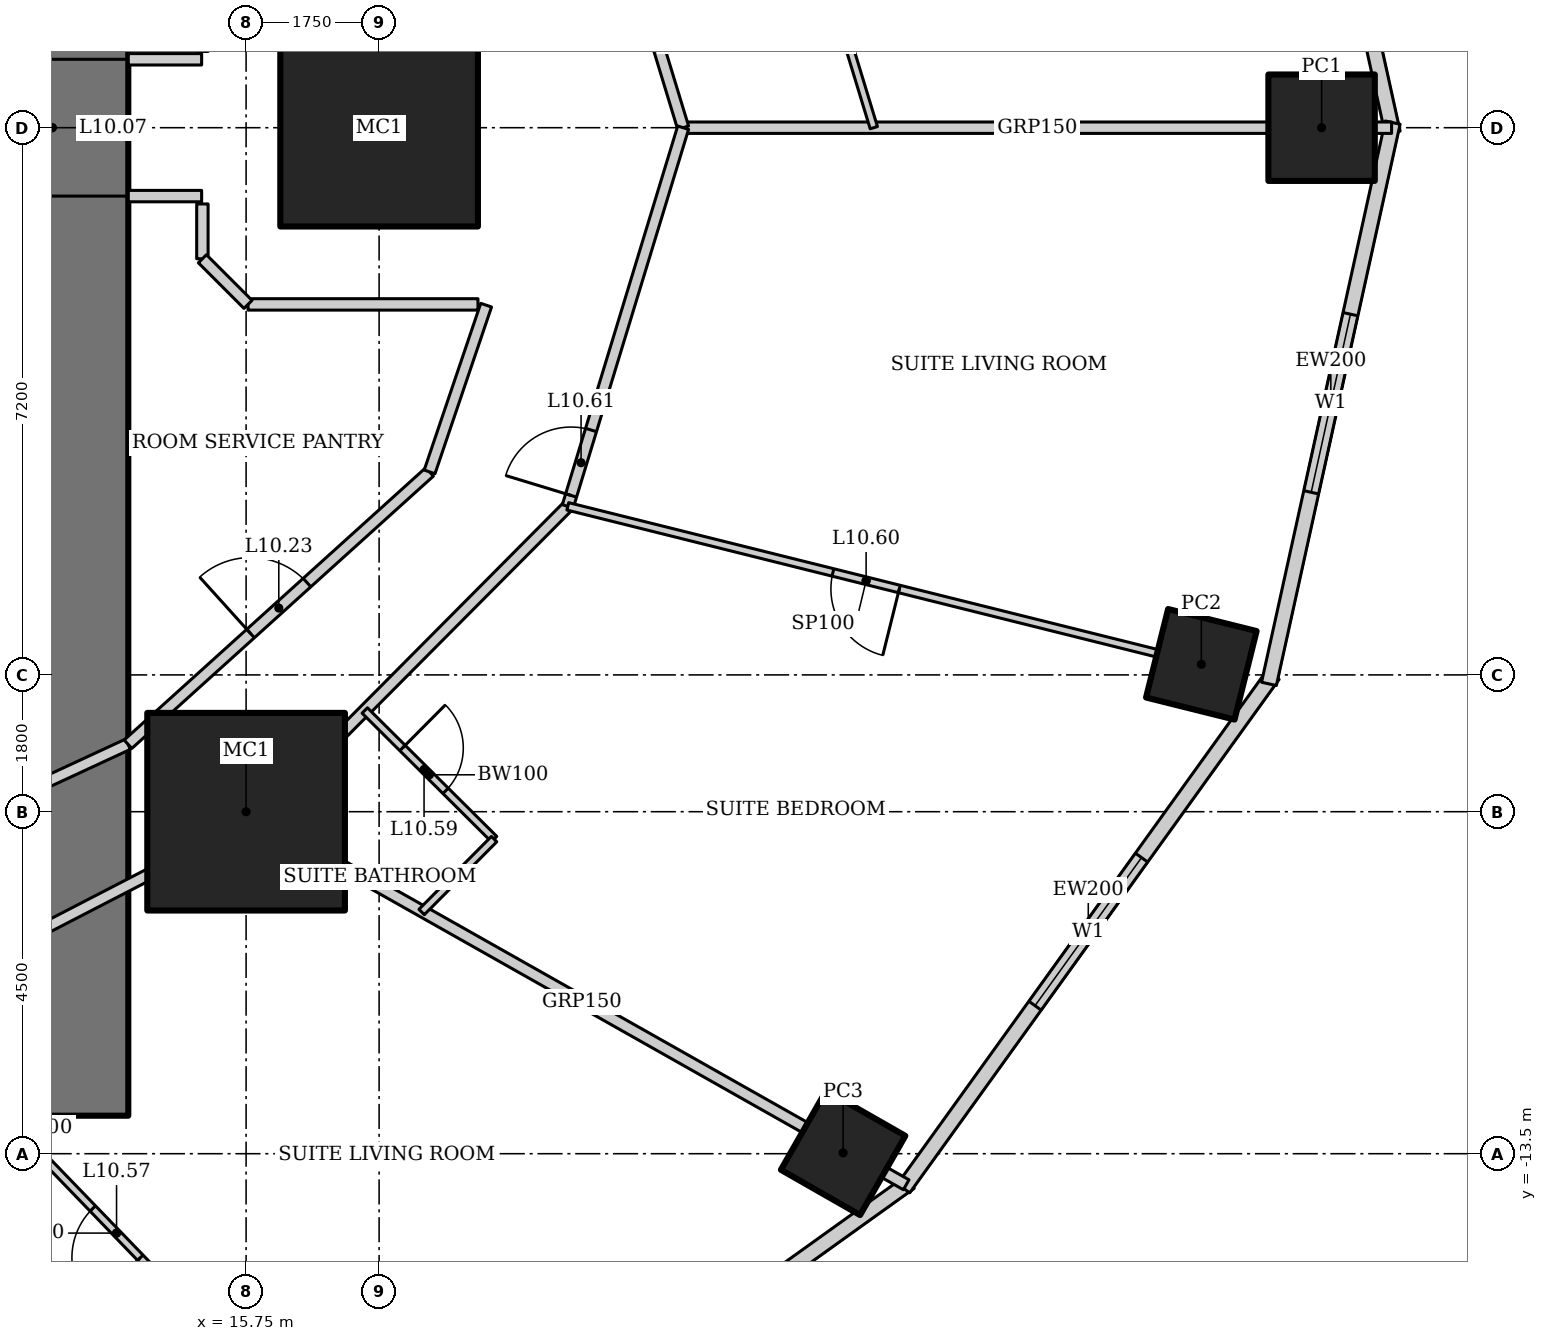
"""IFC4 building model, lengths in metres.
Left out: names, types, materials, properties, quantities, classifications, styles, units other than length and angle.
Written with IfcOpenShell. Run it as: python <this file> out.ifc"""

import sys

from ifc_helpers import new_model, si_unit, direction, frame, frame_2d, origin, origin_2d, place, context, subcontext, project, spatial, rectangle, hollow_rectangle, extrude, element, fill, save


model = new_model("IFC4")
c1 = context("Model", 3, precision=1e-05, world=origin(), true_north=direction((0.0, 1.0)))
c2 = subcontext(c1, "Body", "Model", "MODEL_VIEW")
j1 = project(units=[si_unit("LENGTHUNIT", "METRE"), si_unit("PLANEANGLEUNIT", "RADIAN")], contexts=[c1])
p1 = place(None, origin())
s1 = spatial("IfcSite", under=j1, at=p1, CompositionType="ELEMENT")
p2 = place(p1, origin())
s2 = spatial("IfcBuilding", under=s1, at=p2, CompositionType="ELEMENT")
p3 = place(p2, frame((0.0, 0.0, 51.4)))
s3 = spatial("IfcBuildingStorey", under=s2, at=p3, CompositionType="ELEMENT", Elevation=51.4)
for number, where, z_axis, x_axis in (
    (1, (17.5, 0.0, 0.0), (0.0, 0.0, 1.0), (1.0, 0.0, 0.0)),
    (2, (15.75, -9.0, 0.0), (0.0, 0.0, 1.0), (1.0, 0.0, 0.0)),
):
    element("IfcColumn", number, at=place(p3, frame(where, z_axis=z_axis, x_axis=x_axis)), inside=s3, PredefinedType="COLUMN", context=c2, shape_type="SweptSolid", body=[
        extrude(hollow_rectangle(XDim=2.6, YDim=2.6, WallThickness=0.13, at=origin_2d()), origin(), (0.0, 0.0, 1.0), 3.6),
    ])
p4 = place(p3, frame((29.9, 0.0, 0.0), z_axis=(0.0, 0.0, 1.0), x_axis=(1.0, 0.0, 0.0)))
e3 = element("IfcColumn", 3, at=p4, inside=s3, PredefinedType="COLUMN", context=c2, shape_type="SweptSolid", body=[
    extrude(hollow_rectangle(XDim=1.4, YDim=1.4, WallThickness=0.1, at=origin_2d()), origin(), (0.0, 0.0, 1.0), 3.6),
])
p5 = place(p3, frame((23.605, -13.489, 0.0), z_axis=(0.0, 0.0, 1.0), x_axis=(0.496139221777, 0.86824298017, 0.0)))
e4 = element("IfcColumn", 4, at=p5, inside=s3, PredefinedType="COLUMN", context=c2, shape_type="SweptSolid", body=[
    extrude(hollow_rectangle(XDim=1.2, YDim=1.2, WallThickness=0.12, at=origin_2d()), origin(), (0.0, 0.0, 1.0), 3.6),
])
p6 = place(p3, frame((28.318, -7.06, 0.0), z_axis=(0.0, 0.0, 1.0), x_axis=(0.2419218956, 0.970295726276, 0.0)))
e5 = element("IfcColumn", 5, at=p6, inside=s3, PredefinedType="COLUMN", context=c2, shape_type="SweptSolid", body=[
    extrude(hollow_rectangle(XDim=1.2, YDim=1.2, WallThickness=0.1, at=origin_2d()), origin(), (0.0, 0.0, 1.0), 3.6),
])
p7 = place(p3, frame((13.2, -13.0, 0.0), z_axis=(0.0, 0.0, 1.0), x_axis=(0.0, 1.0, 0.0)))
e6 = element("IfcWall", 6, at=p7, inside=s3, PredefinedType="SHEAR", context=c2, shape_type="SweptSolid", body=[
    extrude(rectangle(XDim=26.0, YDim=2.0, at=frame_2d((13.0, 0.0))), origin(), (0.0, 0.0, 1.0), 3.6),
])
p8 = place(p7, frame((12.1, 0.0, 0.0)))
e7 = element("IfcOpeningElement", 7, at=p8, cuts=e6, PredefinedType="OPENING", context=c2, shape_type="SweptSolid", body=[
    extrude(rectangle(XDim=1.8, YDim=2.1, at=frame_2d((0.9, 1.05))), frame((0.0, 1.01, 0.0), z_axis=(0.0, -1.0, 0.0), x_axis=(1.0, 0.0, 0.0)), (0.0, 0.0, 1.0), 2.02),
])
p9 = place(p3, frame((30.835, -0.067, 0.0), z_axis=(0.0, 0.0, 1.0), x_axis=(-0.215238065514, 0.976561608478, 0.0)))
e8 = element("IfcWall", 8, at=p9, inside=s3, PredefinedType="SOLIDWALL", context=c2, shape_type="SweptSolid", body=[
    extrude(rectangle(XDim=7.562, YDim=0.2, at=frame_2d((3.781, 0.0))), origin(), (0.0, 0.0, 1.0), 3.45),
])
p10 = place(p9, frame((2.581, 0.0, 0.5)))
e9 = element("IfcOpeningElement", 9, at=p10, cuts=e8, PredefinedType="OPENING", context=c2, shape_type="SweptSolid", body=[
    extrude(rectangle(XDim=2.4, YDim=2.2, at=frame_2d((1.2, 1.1))), frame((0.0, 0.11, 0.0), z_axis=(0.0, -1.0, 0.0), x_axis=(1.0, 0.0, 0.0)), (0.0, 0.0, 1.0), 0.22),
])
p11 = place(p3, frame((17.929, -18.572, 0.0), z_axis=(0.0, 0.0, 1.0), x_axis=(0.812791321576, 0.582554948112, 0.0)))
e10 = element("IfcWall", 10, at=p11, inside=s3, PredefinedType="SOLIDWALL", context=c2, shape_type="SweptSolid", body=[
    extrude(rectangle(XDim=8.063, YDim=0.2, at=frame_2d((4.032, 0.0))), origin(), (0.0, 0.0, 1.0), 3.45),
])
p12 = place(p11, frame((2.832, 0.0, 0.5)))
e11 = element("IfcOpeningElement", 11, at=p12, cuts=e10, PredefinedType="OPENING", context=c2, shape_type="SweptSolid", body=[
    extrude(rectangle(XDim=2.4, YDim=2.2, at=frame_2d((1.2, 1.1))), frame((0.0, 0.11, 0.0), z_axis=(0.0, -1.0, 0.0), x_axis=(1.0, 0.0, 0.0)), (0.0, 0.0, 1.0), 0.22),
])
p13 = place(p3, frame((24.4, -13.957, 0.0), z_axis=(0.0, 0.0, 1.0), x_axis=(0.583937613703, 0.811798536155, 0.0)))
e12 = element("IfcWall", 12, at=p13, inside=s3, PredefinedType="SOLIDWALL", context=c2, shape_type="SweptSolid", body=[
    extrude(rectangle(XDim=8.323, YDim=0.2, at=frame_2d((4.162, 0.0))), origin(), (0.0, 0.0, 1.0), 3.45),
])
p14 = place(p13, frame((2.961, 0.0, 0.5)))
e13 = element("IfcOpeningElement", 13, at=p14, cuts=e12, PredefinedType="OPENING", context=c2, shape_type="SweptSolid", body=[
    extrude(rectangle(XDim=2.4, YDim=2.2, at=frame_2d((1.2, 1.1))), frame((0.0, 0.11, 0.0), z_axis=(0.0, -1.0, 0.0), x_axis=(1.0, 0.0, 0.0)), (0.0, 0.0, 1.0), 0.22),
])
p15 = place(p3, frame((29.208, -7.318, 0.0), z_axis=(0.0, 0.0, 1.0), x_axis=(0.215238065514, 0.976561608478, 0.0)))
e14 = element("IfcWall", 14, at=p15, inside=s3, PredefinedType="SOLIDWALL", context=c2, shape_type="SweptSolid", body=[
    extrude(rectangle(XDim=7.562, YDim=0.2, at=frame_2d((3.781, 0.0))), origin(), (0.0, 0.0, 1.0), 3.45),
])
p16 = place(p15, frame((2.581, 0.0, 0.5)))
e15 = element("IfcOpeningElement", 15, at=p16, cuts=e14, PredefinedType="OPENING", context=c2, shape_type="SweptSolid", body=[
    extrude(rectangle(XDim=2.4, YDim=2.2, at=frame_2d((1.2, 1.1))), frame((0.0, 0.11, 0.0), z_axis=(0.0, -1.0, 0.0), x_axis=(1.0, 0.0, 0.0)), (0.0, 0.0, 1.0), 0.22),
])
p17 = place(p3, frame((30.821, 0.0, 0.0), z_axis=(0.0, 0.0, 1.0), x_axis=(-1.0, 0.0, 0.0)))
e16 = element("IfcWall", 16, at=p17, inside=s3, PredefinedType="PARTITIONING", context=c2, shape_type="SweptSolid", body=[
    extrude(rectangle(XDim=9.321, YDim=0.15, at=frame_2d((4.66, 0.0))), origin(), (0.0, 0.0, 1.0), 2.528),
])
p18 = place(p3, frame((24.435, -13.909, 0.0), z_axis=(0.0, 0.0, 1.0), x_axis=(-0.870612006791, 0.491970256856, 0.0)))
e17 = element("IfcWall", 17, at=p18, inside=s3, PredefinedType="PARTITIONING", context=c2, shape_type="SweptSolid", body=[
    extrude(rectangle(XDim=9.802, YDim=0.15, at=frame_2d((4.901, 0.0))), origin(), (0.0, 0.0, 1.0), 2.693),
])
p19 = place(p3, frame((21.5, 0.0, 0.0), z_axis=(0.0, 0.0, 1.0), x_axis=(-0.291383581394, 0.95660629754, 0.0)))
e18 = element("IfcWall", 18, at=p19, inside=s3, PredefinedType="PARTITIONING", context=c2, shape_type="SweptSolid", body=[
    extrude(rectangle(XDim=5.208, YDim=0.15, at=frame_2d((2.604, 0.0))), origin(), (0.0, 0.0, 1.0), 3.45),
])
p20 = place(p3, frame((11.147, -11.544, 0.0), z_axis=(0.0, 0.0, 1.0), x_axis=(0.888333171507, 0.459199495209, 0.0)))
e19 = element("IfcWall", 19, at=p20, inside=s3, PredefinedType="PARTITIONING", context=c2, shape_type="SweptSolid", body=[
    extrude(rectangle(XDim=5.351, YDim=0.15, at=frame_2d((2.676, 0.0))), origin(), (0.0, 0.0, 1.0), 3.45),
])
p21 = place(p20, frame((0.15, 0.0, 0.0)))
e20 = element("IfcOpeningElement", 20, at=p21, cuts=e19, PredefinedType="OPENING", context=c2, shape_type="SweptSolid", body=[
    extrude(rectangle(XDim=0.9, YDim=2.1, at=frame_2d((0.45, 1.05))), frame((0.0, 0.085, 0.0), z_axis=(0.0, -1.0, 0.0), x_axis=(1.0, 0.0, 0.0)), (0.0, 0.0, 1.0), 0.17),
])
p22 = place(p3, frame((15.901, -9.086, 0.0), z_axis=(0.0, 0.0, 1.0), x_axis=(0.705121546414, 0.709086457904, 0.0)))
e21 = element("IfcWall", 21, at=p22, inside=s3, PredefinedType="PARTITIONING", context=c2, shape_type="SweptSolid", body=[
    extrude(rectangle(XDim=5.788, YDim=0.15, at=frame_2d((2.894, 0.0))), origin(), (0.0, 0.0, 1.0), 3.45),
])
p23 = place(p3, frame((19.982, -4.982, 0.0), z_axis=(0.0, 0.0, 1.0), x_axis=(0.291383581394, 0.95660629754, 0.0)))
e22 = element("IfcWall", 22, at=p23, inside=s3, PredefinedType="PARTITIONING", context=c2, shape_type="SweptSolid", body=[
    extrude(rectangle(XDim=5.208, YDim=0.15, at=frame_2d((2.604, 0.0))), origin(), (0.0, 0.0, 1.0), 3.45),
])
p24 = place(p23, frame((0.15, 0.0, 0.0)))
e23 = element("IfcOpeningElement", 23, at=p24, cuts=e22, PredefinedType="OPENING", context=c2, shape_type="SweptSolid", body=[
    extrude(rectangle(XDim=0.9, YDim=2.1, at=frame_2d((0.45, 1.05))), frame((0.0, 0.085, 0.0), z_axis=(0.0, -1.0, 0.0), x_axis=(1.0, 0.0, 0.0)), (0.0, 0.0, 1.0), 0.17),
])
p25 = place(p3, frame((9.801, -10.149, 0.0), z_axis=(0.0, 0.0, 1.0), x_axis=(0.907279653965, 0.420527798727, 0.0)))
e24 = element("IfcWall", 24, at=p25, inside=s3, PredefinedType="PARTITIONING", context=c2, shape_type="SweptSolid", body=[
    extrude(rectangle(XDim=4.844, YDim=0.15, at=frame_2d((2.422, 0.0))), origin(), (0.0, 0.0, 1.0), 3.45),
])
p26 = place(p3, frame((14.196, -8.112, 0.0), z_axis=(0.0, 0.0, 1.0), x_axis=(0.742194222, 0.670184852731, 0.0)))
e25 = element("IfcWall", 25, at=p26, inside=s3, PredefinedType="PARTITIONING", context=c2, shape_type="SweptSolid", body=[
    extrude(rectangle(XDim=5.347, YDim=0.15, at=frame_2d((2.673, 0.0))), origin(), (0.0, 0.0, 1.0), 3.45),
])
p27 = place(p26, frame((2.173, 0.0, 0.0)))
e26 = element("IfcOpeningElement", 26, at=p27, cuts=e25, PredefinedType="OPENING", context=c2, shape_type="SweptSolid", body=[
    extrude(rectangle(XDim=1.0, YDim=2.1, at=frame_2d((0.5, 1.05))), frame((0.0, 0.085, 0.0), z_axis=(0.0, -1.0, 0.0), x_axis=(1.0, 0.0, 0.0)), (0.0, 0.0, 1.0), 0.17),
])
p28 = place(p3, frame((23.213, 2.613, 0.0), z_axis=(0.0, 0.0, 1.0), x_axis=(0.291339473488, -0.956619731757, 0.0)))
e27 = element("IfcWall", 27, at=p28, inside=s3, PredefinedType="PARTITIONING", context=c2, shape_type="SweptSolid", body=[
    extrude(rectangle(XDim=2.731, YDim=0.1, at=frame_2d((1.365, 0.0))), origin(), (0.0, 0.0, 1.0), 3.45),
])
p29 = place(p3, frame((16.944, -17.545, 0.0), z_axis=(0.0, 0.0, 1.0), x_axis=(-0.694680670522, 0.71931826475, 0.0)))
e28 = element("IfcWall", 28, at=p29, inside=s3, PredefinedType="PARTITIONING", context=c2, shape_type="SweptSolid", body=[
    extrude(rectangle(XDim=8.344, YDim=0.1, at=frame_2d((4.172, 0.0))), origin(), (0.0, 0.0, 1.0), 2.528),
])
p30 = place(p29, frame((3.722, 0.0, 0.0)))
e29 = element("IfcOpeningElement", 29, at=p30, cuts=e28, PredefinedType="OPENING", context=c2, shape_type="SweptSolid", body=[
    extrude(rectangle(XDim=0.9, YDim=2.1, at=frame_2d((0.45, 1.05))), frame((0.0, 0.06, 0.0), z_axis=(0.0, -1.0, 0.0), x_axis=(1.0, 0.0, 0.0)), (0.0, 0.0, 1.0), 0.12),
])
p31 = place(p3, frame((17.311, -7.668, 0.0), z_axis=(0.0, 0.0, 1.0), x_axis=(0.709138392716, -0.705069315724, 0.0)))
e30 = element("IfcWall", 30, at=p31, inside=s3, PredefinedType="PARTITIONING", context=c2, shape_type="SweptSolid", body=[
    extrude(rectangle(XDim=2.4, YDim=0.1, at=frame_2d((1.2, 0.0))), origin(), (0.0, 0.0, 1.0), 3.45),
])
p32 = place(p31, frame((0.7, 0.0, 0.0)))
e31 = element("IfcOpeningElement", 31, at=p32, cuts=e30, PredefinedType="OPENING", context=c2, shape_type="SweptSolid", body=[
    extrude(rectangle(XDim=0.8, YDim=2.1, at=frame_2d((0.4, 1.05))), frame((0.0, 0.06, 0.0), z_axis=(0.0, -1.0, 0.0), x_axis=(1.0, 0.0, 0.0)), (0.0, 0.0, 1.0), 0.12),
])
p33 = place(p3, frame((19.013, -9.36, 0.0), z_axis=(0.0, 0.0, 1.0), x_axis=(-0.7051187611, -0.709089227633, 0.0)))
e32 = element("IfcWall", 32, at=p33, inside=s3, PredefinedType="PARTITIONING", context=c2, shape_type="SweptSolid", body=[
    extrude(rectangle(XDim=1.353, YDim=0.1, at=frame_2d((0.676, 0.0))), origin(), (0.0, 0.0, 1.0), 3.45),
])
p34 = place(p3, frame((27.833, -6.939, 0.0), z_axis=(0.0, 0.0, 1.0), x_axis=(-0.97029673161, 0.24191786339, 0.0)))
e33 = element("IfcWall", 33, at=p34, inside=s3, PredefinedType="PARTITIONING", context=c2, shape_type="SweptSolid", body=[
    extrude(rectangle(XDim=8.091, YDim=0.1, at=frame_2d((4.045, 0.0))), origin(), (0.0, 0.0, 1.0), 2.333),
])
p35 = place(p34, frame((3.595, 0.0, 0.0)))
e34 = element("IfcOpeningElement", 34, at=p35, cuts=e33, PredefinedType="OPENING", context=c2, shape_type="SweptSolid", body=[
    extrude(rectangle(XDim=0.9, YDim=2.1, at=frame_2d((0.45, 1.05))), frame((0.0, 0.06, 0.0), z_axis=(0.0, -1.0, 0.0), x_axis=(1.0, 0.0, 0.0)), (0.0, 0.0, 1.0), 0.12),
])
p36 = place(p3, frame((13.2, -13.0, 0.0), z_axis=(0.0, 0.0, 1.0), x_axis=(-0.719347134512, -0.69465077562, 0.0)))
e35 = element("IfcWall", 35, at=p36, inside=s3, PredefinedType="PARTITIONING", context=c2, shape_type="SweptSolid", body=[
    extrude(rectangle(XDim=0.465, YDim=0.1, at=frame_2d((0.232, 0.0))), origin(), (0.0, 0.0, 1.0), 3.45),
])
p37 = place(p3, frame((18.164, -4.529, 0.0), z_axis=(0.0, 0.0, 1.0), x_axis=(0.321124194945, 0.947037090837, 0.0)))
e36 = element("IfcWall", 36, at=p37, inside=s3, PredefinedType="PARTITIONING", context=c2, shape_type="SweptSolid", body=[
    extrude(rectangle(XDim=2.317, YDim=0.15, at=frame_2d((1.158, 0.0))), origin(), (0.0, 0.0, 1.0), 3.45),
])
for number, where, z_axis, x_axis in (
    (37, (14.2, -0.9, 0.0), (0.0, 0.0, 1.0), (1.0, 0.0, 0.0)),
    (38, (14.2, 0.9, 0.0), (0.0, 0.0, 1.0), (1.0, 0.0, 0.0)),
):
    element("IfcWall", number, at=place(p3, frame(where, z_axis=z_axis, x_axis=x_axis)), inside=s3, PredefinedType="PARTITIONING", context=c2, shape_type="SweptSolid", body=[
        extrude(rectangle(XDim=0.965, YDim=0.15, at=frame_2d((0.482, 0.0))), origin(), (0.0, 0.0, 1.0), 3.45),
    ])
p38 = place(p3, frame((15.175, -1.725, 0.0), z_axis=(0.0, 0.0, 1.0), x_axis=(0.0, 1.0, 0.0)))
e39 = element("IfcWall", 39, at=p38, inside=s3, PredefinedType="PARTITIONING", context=c2, shape_type="SweptSolid", body=[
    extrude(rectangle(XDim=0.721, YDim=0.15, at=frame_2d((0.361, 0.0))), origin(), (0.0, 0.0, 1.0), 3.45),
])
p39 = place(p3, frame((18.801, -2.325, 0.0), z_axis=(0.0, 0.0, 1.0), x_axis=(-1.0, 0.0, 0.0)))
e40 = element("IfcWall", 40, at=p39, inside=s3, PredefinedType="PARTITIONING", context=c2, shape_type="SweptSolid", body=[
    extrude(rectangle(XDim=3.025, YDim=0.15, at=frame_2d((1.513, 0.0))), origin(), (0.0, 0.0, 1.0), 3.45),
])
p40 = place(p3, frame((15.775, -2.325, 0.0), z_axis=(0.0, 0.0, 1.0), x_axis=(-0.707106781187, 0.707106781187, 0.0)))
e41 = element("IfcWall", 41, at=p40, inside=s3, PredefinedType="PARTITIONING", context=c2, shape_type="SweptSolid", body=[
    extrude(rectangle(XDim=0.849, YDim=0.15, at=frame_2d((0.425, 0.0))), origin(), (0.0, 0.0, 1.0), 3.45),
])
p41 = place(p14, origin())
e42 = element("IfcWindow", 42, at=p41, inside=s3, PartitioningType="SINGLE_PANEL", PredefinedType="WINDOW", context=c2, shape_type="SweptSolid", body=[
    extrude(rectangle(XDim=2.4, YDim=2.2, at=frame_2d((1.2, 1.1))), frame((0.0, 0.03, 0.0), z_axis=(0.0, -1.0, 0.0), x_axis=(1.0, 0.0, 0.0)), (0.0, 0.0, 1.0), 0.06),
])
fill(e13, e42)
p42 = place(p16, origin())
e43 = element("IfcWindow", 43, at=p42, inside=s3, PartitioningType="SINGLE_PANEL", PredefinedType="WINDOW", context=c2, shape_type="SweptSolid", body=[
    extrude(rectangle(XDim=2.4, YDim=2.2, at=frame_2d((1.2, 1.1))), frame((0.0, 0.03, 0.0), z_axis=(0.0, -1.0, 0.0), x_axis=(1.0, 0.0, 0.0)), (0.0, 0.0, 1.0), 0.06),
])
fill(e15, e43)
p43 = place(p8, origin())
e44 = element("IfcDoor", 44, at=p43, inside=s3, OperationType="DOUBLE_DOOR_DOUBLE_SWING", PredefinedType="DOOR", context=c2, shape_type="SweptSolid", body=[
    extrude(rectangle(XDim=1.8, YDim=2.1, at=frame_2d((0.9, 1.05))), frame((0.0, 0.025, 0.0), z_axis=(0.0, -1.0, 0.0), x_axis=(1.0, 0.0, 0.0)), (0.0, 0.0, 1.0), 0.05),
])
fill(e7, e44)
p44 = place(p27, origin())
e45 = element("IfcDoor", 45, at=p44, inside=s3, OperationType="SINGLE_SWING_LEFT", PredefinedType="DOOR", context=c2, shape_type="SweptSolid", body=[
    extrude(rectangle(XDim=1.0, YDim=2.1, at=frame_2d((0.5, 1.05))), frame((0.0, 0.025, 0.0), z_axis=(0.0, -1.0, 0.0), x_axis=(1.0, 0.0, 0.0)), (0.0, 0.0, 1.0), 0.05),
])
fill(e26, e45)
p45 = place(p30, origin())
e46 = element("IfcDoor", 46, at=p45, inside=s3, OperationType="SINGLE_SWING_LEFT", PredefinedType="DOOR", context=c2, shape_type="SweptSolid", body=[
    extrude(rectangle(XDim=0.9, YDim=2.1, at=frame_2d((0.45, 1.05))), frame((0.0, 0.025, 0.0), z_axis=(0.0, -1.0, 0.0), x_axis=(1.0, 0.0, 0.0)), (0.0, 0.0, 1.0), 0.05),
])
fill(e29, e46)
p46 = place(p32, origin())
e47 = element("IfcDoor", 47, at=p46, inside=s3, OperationType="SINGLE_SWING_LEFT", PredefinedType="DOOR", context=c2, shape_type="SweptSolid", body=[
    extrude(rectangle(XDim=0.8, YDim=2.1, at=frame_2d((0.4, 1.05))), frame((0.0, 0.025, 0.0), z_axis=(0.0, -1.0, 0.0), x_axis=(1.0, 0.0, 0.0)), (0.0, 0.0, 1.0), 0.05),
])
fill(e31, e47)
p47 = place(p35, origin())
e48 = element("IfcDoor", 48, at=p47, inside=s3, OperationType="SINGLE_SWING_LEFT", PredefinedType="DOOR", context=c2, shape_type="SweptSolid", body=[
    extrude(rectangle(XDim=0.9, YDim=2.1, at=frame_2d((0.45, 1.05))), frame((0.0, 0.025, 0.0), z_axis=(0.0, -1.0, 0.0), x_axis=(1.0, 0.0, 0.0)), (0.0, 0.0, 1.0), 0.05),
])
fill(e34, e48)
p48 = place(p24, origin())
e49 = element("IfcDoor", 49, at=p48, inside=s3, OperationType="SINGLE_SWING_LEFT", PredefinedType="DOOR", context=c2, shape_type="SweptSolid", body=[
    extrude(rectangle(XDim=0.9, YDim=2.1, at=frame_2d((0.45, 1.05))), frame((0.0, 0.025, 0.0), z_axis=(0.0, -1.0, 0.0), x_axis=(1.0, 0.0, 0.0)), (0.0, 0.0, 1.0), 0.05),
])
fill(e23, e49)
save(model, sys.argv[1])
